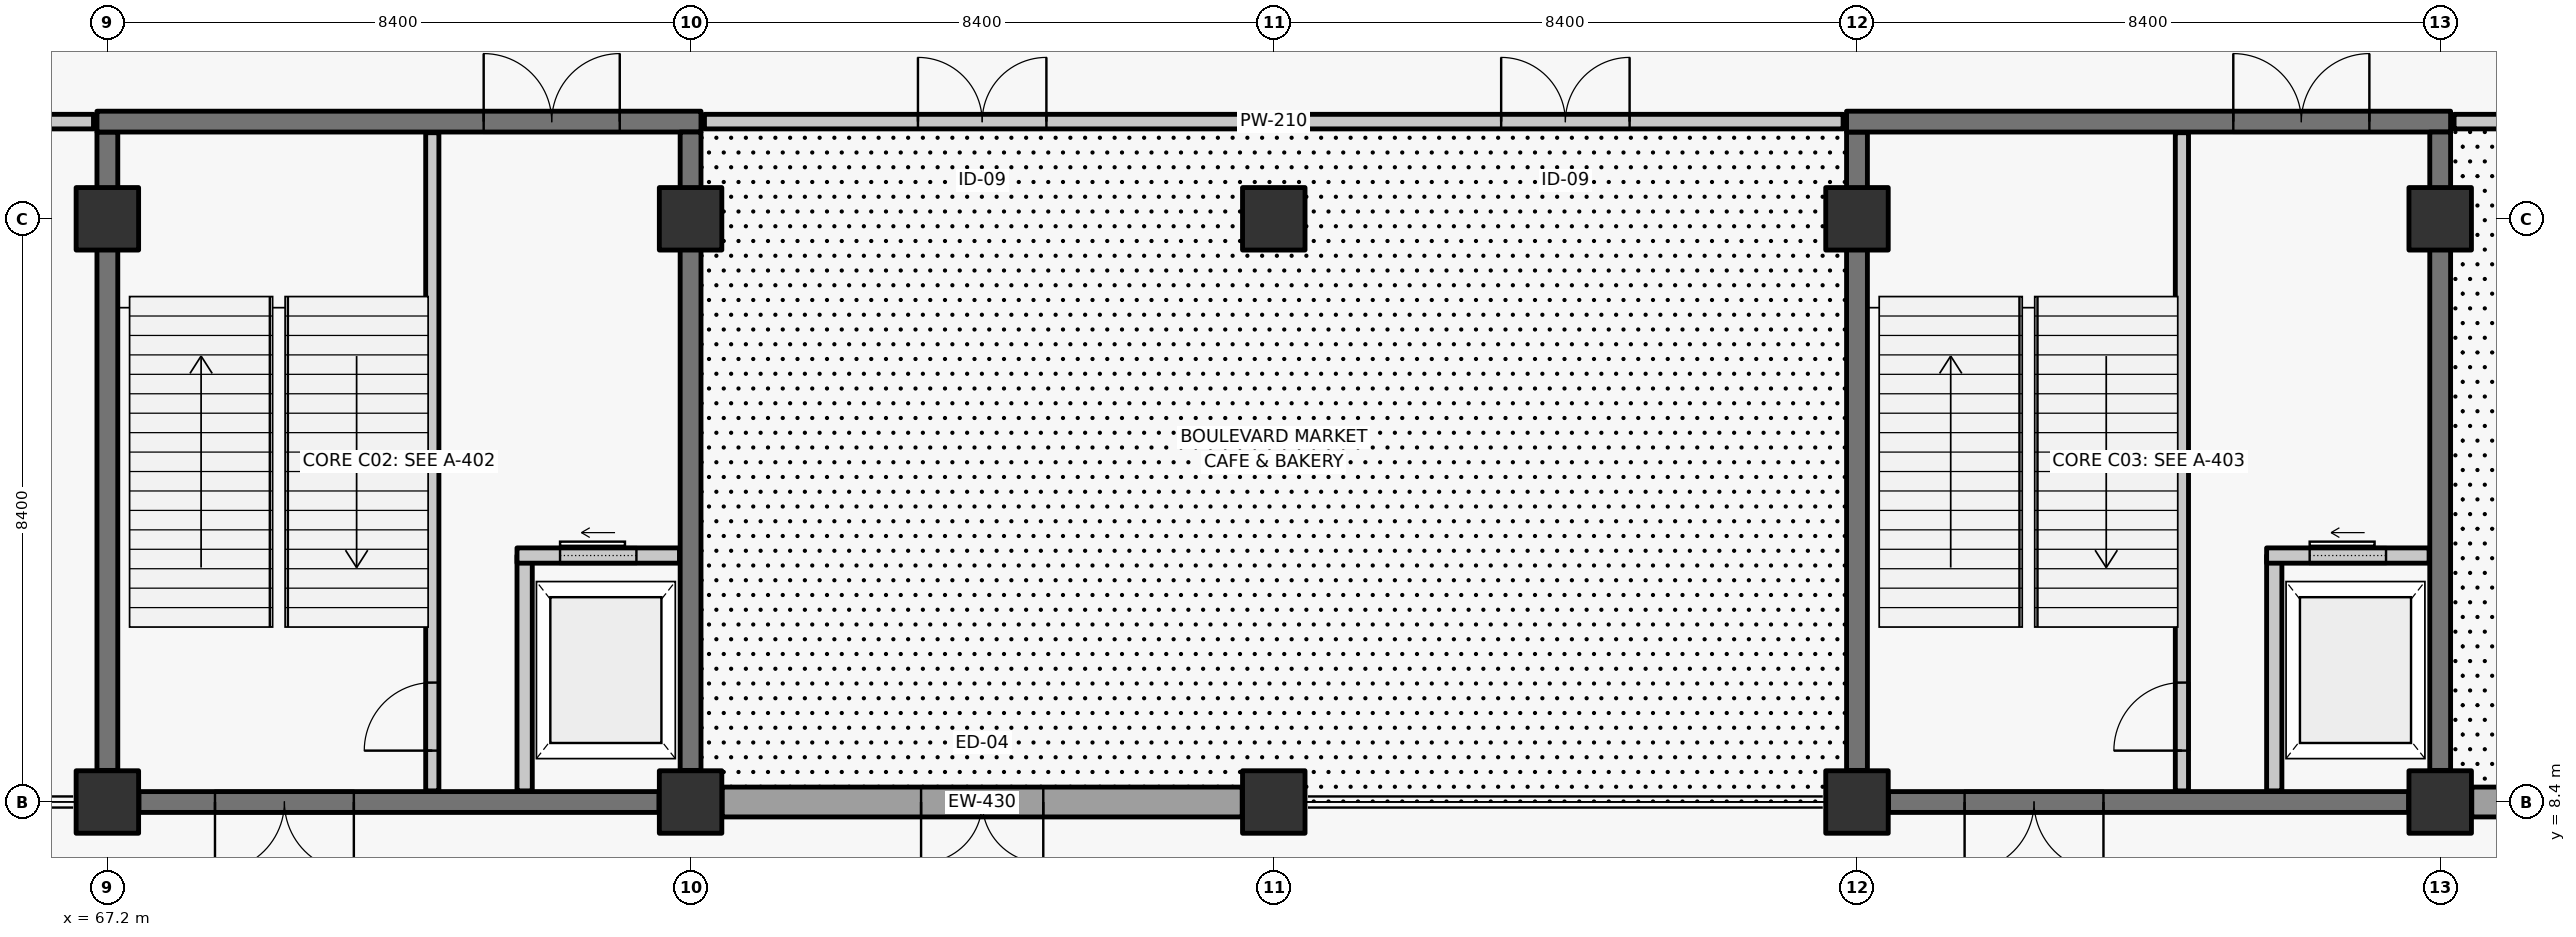
"""IFC4 building model, lengths in metres.
Left out: names, types, materials, properties, quantities, classifications, styles, units other than length and angle.
Written with IfcOpenShell. Run it as: python <this file> out.ifc"""

import sys

from ifc_helpers import new_model, si_unit, direction, frame, frame_2d, origin, origin_2d, place, context, subcontext, project, spatial, rectangle, extrude, element, fill, save


model = new_model("IFC4")
c1 = context("Model", 3, precision=1e-05, world=origin(), true_north=direction((0.0, 1.0)))
c2 = subcontext(c1, "Body", "Model", "MODEL_VIEW")
j1 = project(units=[si_unit("LENGTHUNIT", "METRE"), si_unit("PLANEANGLEUNIT", "RADIAN")], contexts=[c1])
p1 = place(None, origin())
s1 = spatial("IfcSite", under=j1, at=p1, CompositionType="ELEMENT")
p2 = place(p1, origin())
s2 = spatial("IfcBuilding", under=s1, at=p2, CompositionType="ELEMENT")
p3 = place(p2, origin())
s3 = spatial("IfcBuildingStorey", under=s2, at=p3, CompositionType="ELEMENT", Elevation=0.0)
for number, where, z_axis, x_axis in (
    (1, (67.2, 8.4, -0.36), (0.0, 0.0, 1.0), (1.0, 0.0, 0.0)),
    (2, (67.2, 16.8, -0.36), (0.0, 0.0, 1.0), (1.0, 0.0, 0.0)),
    (3, (75.6, 8.4, -0.36), (0.0, 0.0, 1.0), (1.0, 0.0, 0.0)),
    (4, (75.6, 16.8, -0.36), (0.0, 0.0, 1.0), (1.0, 0.0, 0.0)),
    (5, (84.0, 8.4, -0.36), (0.0, 0.0, 1.0), (1.0, 0.0, 0.0)),
    (6, (84.0, 16.8, -0.36), (0.0, 0.0, 1.0), (1.0, 0.0, 0.0)),
    (7, (92.4, 8.4, -0.36), (0.0, 0.0, 1.0), (1.0, 0.0, 0.0)),
    (8, (92.4, 16.8, -0.36), (0.0, 0.0, 1.0), (1.0, 0.0, 0.0)),
    (9, (100.8, 8.4, -0.36), (0.0, 0.0, 1.0), (1.0, 0.0, 0.0)),
    (10, (100.8, 16.8, -0.36), (0.0, 0.0, 1.0), (1.0, 0.0, 0.0)),
):
    element("IfcColumn", number, at=place(p3, frame(where, z_axis=z_axis, x_axis=x_axis)), inside=s3, PredefinedType="COLUMN", context=c2, shape_type="SweptSolid", body=[
        extrude(rectangle(XDim=0.9, YDim=0.9, at=origin_2d()), origin(), (0.0, 0.0, 1.0), 6.36),
    ])
p4 = place(p3, frame((83.545, 8.4, 0.0), z_axis=(0.0, 0.0, 1.0), x_axis=(-1.0, 0.0, 0.0)))
e11 = element("IfcWall", 11, at=p4, inside=s3, PredefinedType="SOLIDWALL", context=c2, shape_type="SweptSolid", body=[
    extrude(rectangle(XDim=7.49, YDim=0.43, at=frame_2d((3.745, 0.0))), origin(), (0.0, 0.0, 1.0), 5.13),
])
p5 = place(p4, frame((2.865, 0.0, 0.0)))
e12 = element("IfcOpeningElement", 12, at=p5, cuts=e11, PredefinedType="OPENING", context=c2, shape_type="SweptSolid", body=[
    extrude(rectangle(XDim=1.76, YDim=2.36, at=frame_2d((0.88, 1.18))), frame((0.0, 0.225, 0.0), z_axis=(0.0, -1.0, 0.0), x_axis=(1.0, 0.0, 0.0)), (0.0, 0.0, 1.0), 0.45),
])
p6 = place(p3, frame((108.745, 8.4, 0.0), z_axis=(0.0, 0.0, 1.0), x_axis=(-1.0, 0.0, 0.0)))
e13 = element("IfcWall", 13, at=p6, inside=s3, PredefinedType="SOLIDWALL", context=c2, shape_type="SweptSolid", body=[
    extrude(rectangle(XDim=7.49, YDim=0.43, at=frame_2d((3.745, 0.0))), origin(), (0.0, 0.0, 1.0), 5.13),
])
p7 = place(p6, frame((2.545, 0.0, 0.0)))
e14 = element("IfcOpeningElement", 14, at=p7, cuts=e13, PredefinedType="OPENING", context=c2, shape_type="SweptSolid", body=[
    extrude(rectangle(XDim=2.4, YDim=2.6, at=frame_2d((1.2, 1.3))), frame((0.0, 0.225, 0.0), z_axis=(0.0, -1.0, 0.0), x_axis=(1.0, 0.0, 0.0)), (0.0, 0.0, 1.0), 0.45),
])
p8 = place(p3, frame((75.145, 8.4, -0.36), z_axis=(0.0, 0.0, 1.0), x_axis=(-1.0, 0.0, 0.0)))
e15 = element("IfcWall", 15, at=p8, inside=s3, PredefinedType="SHEAR", context=c2, shape_type="SweptSolid", body=[
    extrude(rectangle(XDim=7.49, YDim=0.3, at=frame_2d((3.745, 0.0))), origin(), (0.0, 0.0, 1.0), 6.08),
])
p9 = place(p8, frame((4.395, 0.0, 0.36)))
e16 = element("IfcOpeningElement", 16, at=p9, cuts=e15, PredefinedType="OPENING", context=c2, shape_type="SweptSolid", body=[
    extrude(rectangle(XDim=2.0, YDim=2.28, at=frame_2d((1.0, 1.14))), frame((0.0, 0.16, 0.0), z_axis=(0.0, -1.0, 0.0), x_axis=(1.0, 0.0, 0.0)), (0.0, 0.0, 1.0), 0.32),
])
p10 = place(p3, frame((67.2, 8.855, -0.36), z_axis=(0.0, 0.0, 1.0), x_axis=(0.0, 1.0, 0.0)))
e17 = element("IfcWall", 17, at=p10, inside=s3, PredefinedType="SHEAR", context=c2, shape_type="SweptSolid", body=[
    extrude(rectangle(XDim=9.195, YDim=0.3, at=frame_2d((4.598, 0.0))), origin(), (0.0, 0.0, 1.0), 6.08),
])
p11 = place(p3, frame((67.05, 18.2, -0.36), z_axis=(0.0, 0.0, 1.0), x_axis=(1.0, 0.0, 0.0)))
e18 = element("IfcWall", 18, at=p11, inside=s3, PredefinedType="SHEAR", context=c2, shape_type="SweptSolid", body=[
    extrude(rectangle(XDim=8.7, YDim=0.3, at=frame_2d((4.35, 0.0))), origin(), (0.0, 0.0, 1.0), 6.08),
])
p12 = place(p11, frame((5.57, 0.0, 0.36)))
e19 = element("IfcOpeningElement", 19, at=p12, cuts=e18, PredefinedType="OPENING", context=c2, shape_type="SweptSolid", body=[
    extrude(rectangle(XDim=1.96, YDim=2.2, at=frame_2d((0.98, 1.1))), frame((0.0, 0.16, 0.0), z_axis=(0.0, -1.0, 0.0), x_axis=(1.0, 0.0, 0.0)), (0.0, 0.0, 1.0), 0.32),
])
p13 = place(p3, frame((75.6, 18.05, -0.36), z_axis=(0.0, 0.0, 1.0), x_axis=(0.0, -1.0, 0.0)))
e20 = element("IfcWall", 20, at=p13, inside=s3, PredefinedType="SHEAR", context=c2, shape_type="SweptSolid", body=[
    extrude(rectangle(XDim=9.195, YDim=0.3, at=frame_2d((4.598, 0.0))), origin(), (0.0, 0.0, 1.0), 6.08),
])
p14 = place(p3, frame((71.88, 8.56, -0.36), z_axis=(0.0, 0.0, 1.0), x_axis=(0.0, 1.0, 0.0)))
e21 = element("IfcWall", 21, at=p14, inside=s3, PredefinedType="SOLIDWALL", context=c2, shape_type="SweptSolid", body=[
    extrude(rectangle(XDim=9.48, YDim=0.19, at=frame_2d((4.74, 0.0))), origin(), (0.0, 0.0, 1.0), 6.08),
])
p15 = place(p14, frame((0.58, 0.0, 0.36)))
e22 = element("IfcOpeningElement", 22, at=p15, cuts=e21, PredefinedType="OPENING", context=c2, shape_type="SweptSolid", body=[
    extrude(rectangle(XDim=0.98, YDim=2.15, at=frame_2d((0.49, 1.075))), frame((0.0, 0.105, 0.0), z_axis=(0.0, -1.0, 0.0), x_axis=(1.0, 0.0, 0.0)), (0.0, 0.0, 1.0), 0.21),
])
p16 = place(p3, frame((73.21, 8.56, 0.0), z_axis=(0.0, 0.0, 1.0), x_axis=(0.0, 1.0, 0.0)))
e23 = element("IfcWall", 23, at=p16, inside=s3, PredefinedType="SOLIDWALL", context=c2, shape_type="SweptSolid", body=[
    extrude(rectangle(XDim=3.39, YDim=0.22, at=frame_2d((1.695, 0.0))), origin(), (0.0, 0.0, 1.0), 5.72),
])
p17 = place(p3, frame((73.1, 11.95, 0.0), z_axis=(0.0, 0.0, 1.0), x_axis=(1.0, 0.0, 0.0)))
e24 = element("IfcWall", 24, at=p17, inside=s3, PredefinedType="SOLIDWALL", context=c2, shape_type="SweptSolid", body=[
    extrude(rectangle(XDim=2.34, YDim=0.22, at=frame_2d((1.17, 0.0))), origin(), (0.0, 0.0, 1.0), 5.72),
])
p18 = place(p17, frame((0.62, 0.0, 0.0)))
e25 = element("IfcOpeningElement", 25, at=p18, cuts=e24, PredefinedType="OPENING", context=c2, shape_type="SweptSolid", body=[
    extrude(rectangle(XDim=1.1, YDim=2.2, at=frame_2d((0.55, 1.1))), frame((0.0, 0.12, 0.0), z_axis=(0.0, -1.0, 0.0), x_axis=(1.0, 0.0, 0.0)), (0.0, 0.0, 1.0), 0.24),
])
p19 = place(p3, frame((100.345, 8.4, -0.36), z_axis=(0.0, 0.0, 1.0), x_axis=(-1.0, 0.0, 0.0)))
e26 = element("IfcWall", 26, at=p19, inside=s3, PredefinedType="SHEAR", context=c2, shape_type="SweptSolid", body=[
    extrude(rectangle(XDim=7.49, YDim=0.3, at=frame_2d((3.745, 0.0))), origin(), (0.0, 0.0, 1.0), 6.08),
])
p20 = place(p19, frame((4.395, 0.0, 0.36)))
e27 = element("IfcOpeningElement", 27, at=p20, cuts=e26, PredefinedType="OPENING", context=c2, shape_type="SweptSolid", body=[
    extrude(rectangle(XDim=2.0, YDim=2.28, at=frame_2d((1.0, 1.14))), frame((0.0, 0.16, 0.0), z_axis=(0.0, -1.0, 0.0), x_axis=(1.0, 0.0, 0.0)), (0.0, 0.0, 1.0), 0.32),
])
p21 = place(p3, frame((92.4, 8.855, -0.36), z_axis=(0.0, 0.0, 1.0), x_axis=(0.0, 1.0, 0.0)))
e28 = element("IfcWall", 28, at=p21, inside=s3, PredefinedType="SHEAR", context=c2, shape_type="SweptSolid", body=[
    extrude(rectangle(XDim=9.195, YDim=0.3, at=frame_2d((4.598, 0.0))), origin(), (0.0, 0.0, 1.0), 6.08),
])
p22 = place(p3, frame((92.25, 18.2, -0.36), z_axis=(0.0, 0.0, 1.0), x_axis=(1.0, 0.0, 0.0)))
e29 = element("IfcWall", 29, at=p22, inside=s3, PredefinedType="SHEAR", context=c2, shape_type="SweptSolid", body=[
    extrude(rectangle(XDim=8.7, YDim=0.3, at=frame_2d((4.35, 0.0))), origin(), (0.0, 0.0, 1.0), 6.08),
])
p23 = place(p22, frame((5.57, 0.0, 0.36)))
e30 = element("IfcOpeningElement", 30, at=p23, cuts=e29, PredefinedType="OPENING", context=c2, shape_type="SweptSolid", body=[
    extrude(rectangle(XDim=1.96, YDim=2.2, at=frame_2d((0.98, 1.1))), frame((0.0, 0.16, 0.0), z_axis=(0.0, -1.0, 0.0), x_axis=(1.0, 0.0, 0.0)), (0.0, 0.0, 1.0), 0.32),
])
p24 = place(p3, frame((100.8, 18.05, -0.36), z_axis=(0.0, 0.0, 1.0), x_axis=(0.0, -1.0, 0.0)))
e31 = element("IfcWall", 31, at=p24, inside=s3, PredefinedType="SHEAR", context=c2, shape_type="SweptSolid", body=[
    extrude(rectangle(XDim=9.195, YDim=0.3, at=frame_2d((4.598, 0.0))), origin(), (0.0, 0.0, 1.0), 6.08),
])
p25 = place(p3, frame((97.08, 8.56, -0.36), z_axis=(0.0, 0.0, 1.0), x_axis=(0.0, 1.0, 0.0)))
e32 = element("IfcWall", 32, at=p25, inside=s3, PredefinedType="SOLIDWALL", context=c2, shape_type="SweptSolid", body=[
    extrude(rectangle(XDim=9.48, YDim=0.19, at=frame_2d((4.74, 0.0))), origin(), (0.0, 0.0, 1.0), 6.08),
])
p26 = place(p25, frame((0.58, 0.0, 0.36)))
e33 = element("IfcOpeningElement", 33, at=p26, cuts=e32, PredefinedType="OPENING", context=c2, shape_type="SweptSolid", body=[
    extrude(rectangle(XDim=0.98, YDim=2.15, at=frame_2d((0.49, 1.075))), frame((0.0, 0.105, 0.0), z_axis=(0.0, -1.0, 0.0), x_axis=(1.0, 0.0, 0.0)), (0.0, 0.0, 1.0), 0.21),
])
p27 = place(p3, frame((98.41, 8.56, 0.0), z_axis=(0.0, 0.0, 1.0), x_axis=(0.0, 1.0, 0.0)))
e34 = element("IfcWall", 34, at=p27, inside=s3, PredefinedType="SOLIDWALL", context=c2, shape_type="SweptSolid", body=[
    extrude(rectangle(XDim=3.39, YDim=0.22, at=frame_2d((1.695, 0.0))), origin(), (0.0, 0.0, 1.0), 5.72),
])
p28 = place(p3, frame((98.3, 11.95, 0.0), z_axis=(0.0, 0.0, 1.0), x_axis=(1.0, 0.0, 0.0)))
e35 = element("IfcWall", 35, at=p28, inside=s3, PredefinedType="SOLIDWALL", context=c2, shape_type="SweptSolid", body=[
    extrude(rectangle(XDim=2.34, YDim=0.22, at=frame_2d((1.17, 0.0))), origin(), (0.0, 0.0, 1.0), 5.72),
])
p29 = place(p28, frame((0.62, 0.0, 0.0)))
e36 = element("IfcOpeningElement", 36, at=p29, cuts=e35, PredefinedType="OPENING", context=c2, shape_type="SweptSolid", body=[
    extrude(rectangle(XDim=1.1, YDim=2.2, at=frame_2d((0.55, 1.1))), frame((0.0, 0.12, 0.0), z_axis=(0.0, -1.0, 0.0), x_axis=(1.0, 0.0, 0.0)), (0.0, 0.0, 1.0), 0.24),
])
p30 = place(p3, frame((33.8, 18.2, 0.0), z_axis=(0.0, 0.0, 1.0), x_axis=(1.0, 0.0, 0.0)))
e37 = element("IfcWall", 37, at=p30, inside=s3, PredefinedType="PARTITIONING", context=c2, shape_type="SweptSolid", body=[
    extrude(rectangle(XDim=33.2, YDim=0.21, at=frame_2d((16.6, 0.0))), origin(), (0.0, 0.0, 1.0), 5.72),
])
p31 = place(p30, frame((3.41, 0.0, 0.0)))
e38 = element("IfcOpeningElement", 38, at=p31, cuts=e37, PredefinedType="OPENING", context=c2, shape_type="SweptSolid", body=[
    extrude(rectangle(XDim=1.18, YDim=2.16, at=frame_2d((0.59, 1.08))), frame((0.0, 0.115, 0.0), z_axis=(0.0, -1.0, 0.0), x_axis=(1.0, 0.0, 0.0)), (0.0, 0.0, 1.0), 0.23),
])
p32 = place(p30, frame((20.21, 0.0, 0.0)))
e39 = element("IfcOpeningElement", 39, at=p32, cuts=e37, PredefinedType="OPENING", context=c2, shape_type="SweptSolid", body=[
    extrude(rectangle(XDim=1.18, YDim=2.16, at=frame_2d((0.59, 1.08))), frame((0.0, 0.115, 0.0), z_axis=(0.0, -1.0, 0.0), x_axis=(1.0, 0.0, 0.0)), (0.0, 0.0, 1.0), 0.23),
])
p33 = place(p3, frame((75.8, 18.2, 0.0), z_axis=(0.0, 0.0, 1.0), x_axis=(1.0, 0.0, 0.0)))
e40 = element("IfcWall", 40, at=p33, inside=s3, PredefinedType="PARTITIONING", context=c2, shape_type="SweptSolid", body=[
    extrude(rectangle(XDim=16.4, YDim=0.21, at=frame_2d((8.2, 0.0))), origin(), (0.0, 0.0, 1.0), 5.72),
])
p34 = place(p33, frame((3.075, 0.0, 0.0)))
e41 = element("IfcOpeningElement", 41, at=p34, cuts=e40, PredefinedType="OPENING", context=c2, shape_type="SweptSolid", body=[
    extrude(rectangle(XDim=1.85, YDim=2.25, at=frame_2d((0.925, 1.125))), frame((0.0, 0.115, 0.0), z_axis=(0.0, -1.0, 0.0), x_axis=(1.0, 0.0, 0.0)), (0.0, 0.0, 1.0), 0.23),
])
p35 = place(p33, frame((11.475, 0.0, 0.0)))
e42 = element("IfcOpeningElement", 42, at=p35, cuts=e40, PredefinedType="OPENING", context=c2, shape_type="SweptSolid", body=[
    extrude(rectangle(XDim=1.85, YDim=2.25, at=frame_2d((0.925, 1.125))), frame((0.0, 0.115, 0.0), z_axis=(0.0, -1.0, 0.0), x_axis=(1.0, 0.0, 0.0)), (0.0, 0.0, 1.0), 0.23),
])
p36 = place(p3, frame((101.0, 18.2, 0.0), z_axis=(0.0, 0.0, 1.0), x_axis=(1.0, 0.0, 0.0)))
e43 = element("IfcWall", 43, at=p36, inside=s3, PredefinedType="PARTITIONING", context=c2, shape_type="SweptSolid", body=[
    extrude(rectangle(XDim=16.4, YDim=0.21, at=frame_2d((8.2, 0.0))), origin(), (0.0, 0.0, 1.0), 5.72),
])
p37 = place(p36, frame((3.075, 0.0, 0.0)))
e44 = element("IfcOpeningElement", 44, at=p37, cuts=e43, PredefinedType="OPENING", context=c2, shape_type="SweptSolid", body=[
    extrude(rectangle(XDim=1.85, YDim=2.25, at=frame_2d((0.925, 1.125))), frame((0.0, 0.115, 0.0), z_axis=(0.0, -1.0, 0.0), x_axis=(1.0, 0.0, 0.0)), (0.0, 0.0, 1.0), 0.23),
])
p38 = place(p36, frame((11.475, 0.0, 0.0)))
e45 = element("IfcOpeningElement", 45, at=p38, cuts=e43, PredefinedType="OPENING", context=c2, shape_type="SweptSolid", body=[
    extrude(rectangle(XDim=1.85, YDim=2.25, at=frame_2d((0.925, 1.125))), frame((0.0, 0.115, 0.0), z_axis=(0.0, -1.0, 0.0), x_axis=(1.0, 0.0, 0.0)), (0.0, 0.0, 1.0), 0.23),
])
p39 = place(p5, origin())
e46 = element("IfcDoor", 46, at=p39, inside=s3, OperationType="DOUBLE_DOOR_SINGLE_SWING", PredefinedType="DOOR", context=c2, shape_type="SweptSolid", body=[
    extrude(rectangle(XDim=1.76, YDim=2.36, at=frame_2d((0.88, 1.18))), frame((0.0, 0.025, 0.0), z_axis=(0.0, -1.0, 0.0), x_axis=(1.0, 0.0, 0.0)), (0.0, 0.0, 1.0), 0.05),
])
fill(e12, e46)
p40 = place(p15, origin())
e47 = element("IfcDoor", 47, at=p40, inside=s3, OperationType="SINGLE_SWING_LEFT", PredefinedType="DOOR", context=c2, shape_type="SweptSolid", body=[
    extrude(rectangle(XDim=0.98, YDim=2.15, at=frame_2d((0.49, 1.075))), frame((0.0, 0.025, 0.0), z_axis=(0.0, -1.0, 0.0), x_axis=(1.0, 0.0, 0.0)), (0.0, 0.0, 1.0), 0.05),
])
fill(e22, e47)
p41 = place(p12, origin())
e48 = element("IfcDoor", 48, at=p41, inside=s3, OperationType="DOUBLE_DOOR_SINGLE_SWING", PredefinedType="DOOR", context=c2, shape_type="SweptSolid", body=[
    extrude(rectangle(XDim=1.96, YDim=2.2, at=frame_2d((0.98, 1.1))), frame((0.0, 0.025, 0.0), z_axis=(0.0, -1.0, 0.0), x_axis=(1.0, 0.0, 0.0)), (0.0, 0.0, 1.0), 0.05),
])
fill(e19, e48)
p42 = place(p9, origin())
e49 = element("IfcDoor", 49, at=p42, inside=s3, OperationType="DOUBLE_DOOR_SINGLE_SWING", PredefinedType="DOOR", context=c2, shape_type="SweptSolid", body=[
    extrude(rectangle(XDim=2.0, YDim=2.28, at=frame_2d((1.0, 1.14))), frame((0.0, 0.025, 0.0), z_axis=(0.0, -1.0, 0.0), x_axis=(1.0, 0.0, 0.0)), (0.0, 0.0, 1.0), 0.05),
])
fill(e16, e49)
p43 = place(p18, origin())
e50 = element("IfcDoor", 50, at=p43, inside=s3, OperationType="SLIDING_TO_LEFT", PredefinedType="DOOR", context=c2, shape_type="SweptSolid", body=[
    extrude(rectangle(XDim=1.1, YDim=2.2, at=frame_2d((0.55, 1.1))), frame((0.0, 0.025, 0.0), z_axis=(0.0, -1.0, 0.0), x_axis=(1.0, 0.0, 0.0)), (0.0, 0.0, 1.0), 0.05),
])
fill(e25, e50)
p44 = place(p26, origin())
e51 = element("IfcDoor", 51, at=p44, inside=s3, OperationType="SINGLE_SWING_LEFT", PredefinedType="DOOR", context=c2, shape_type="SweptSolid", body=[
    extrude(rectangle(XDim=0.98, YDim=2.15, at=frame_2d((0.49, 1.075))), frame((0.0, 0.025, 0.0), z_axis=(0.0, -1.0, 0.0), x_axis=(1.0, 0.0, 0.0)), (0.0, 0.0, 1.0), 0.05),
])
fill(e33, e51)
p45 = place(p23, origin())
e52 = element("IfcDoor", 52, at=p45, inside=s3, OperationType="DOUBLE_DOOR_SINGLE_SWING", PredefinedType="DOOR", context=c2, shape_type="SweptSolid", body=[
    extrude(rectangle(XDim=1.96, YDim=2.2, at=frame_2d((0.98, 1.1))), frame((0.0, 0.025, 0.0), z_axis=(0.0, -1.0, 0.0), x_axis=(1.0, 0.0, 0.0)), (0.0, 0.0, 1.0), 0.05),
])
fill(e30, e52)
p46 = place(p20, origin())
e53 = element("IfcDoor", 53, at=p46, inside=s3, OperationType="DOUBLE_DOOR_SINGLE_SWING", PredefinedType="DOOR", context=c2, shape_type="SweptSolid", body=[
    extrude(rectangle(XDim=2.0, YDim=2.28, at=frame_2d((1.0, 1.14))), frame((0.0, 0.025, 0.0), z_axis=(0.0, -1.0, 0.0), x_axis=(1.0, 0.0, 0.0)), (0.0, 0.0, 1.0), 0.05),
])
fill(e27, e53)
p47 = place(p29, origin())
e54 = element("IfcDoor", 54, at=p47, inside=s3, OperationType="SLIDING_TO_LEFT", PredefinedType="DOOR", context=c2, shape_type="SweptSolid", body=[
    extrude(rectangle(XDim=1.1, YDim=2.2, at=frame_2d((0.55, 1.1))), frame((0.0, 0.025, 0.0), z_axis=(0.0, -1.0, 0.0), x_axis=(1.0, 0.0, 0.0)), (0.0, 0.0, 1.0), 0.05),
])
fill(e36, e54)
p48 = place(p34, origin())
e55 = element("IfcDoor", 55, at=p48, inside=s3, OperationType="DOUBLE_DOOR_SINGLE_SWING", PredefinedType="DOOR", context=c2, shape_type="SweptSolid", body=[
    extrude(rectangle(XDim=1.85, YDim=2.25, at=frame_2d((0.925, 1.125))), frame((0.0, 0.025, 0.0), z_axis=(0.0, -1.0, 0.0), x_axis=(1.0, 0.0, 0.0)), (0.0, 0.0, 1.0), 0.05),
])
fill(e41, e55)
p49 = place(p35, origin())
e56 = element("IfcDoor", 56, at=p49, inside=s3, OperationType="DOUBLE_DOOR_SINGLE_SWING", PredefinedType="DOOR", context=c2, shape_type="SweptSolid", body=[
    extrude(rectangle(XDim=1.85, YDim=2.25, at=frame_2d((0.925, 1.125))), frame((0.0, 0.025, 0.0), z_axis=(0.0, -1.0, 0.0), x_axis=(1.0, 0.0, 0.0)), (0.0, 0.0, 1.0), 0.05),
])
fill(e42, e56)
save(model, sys.argv[1])
